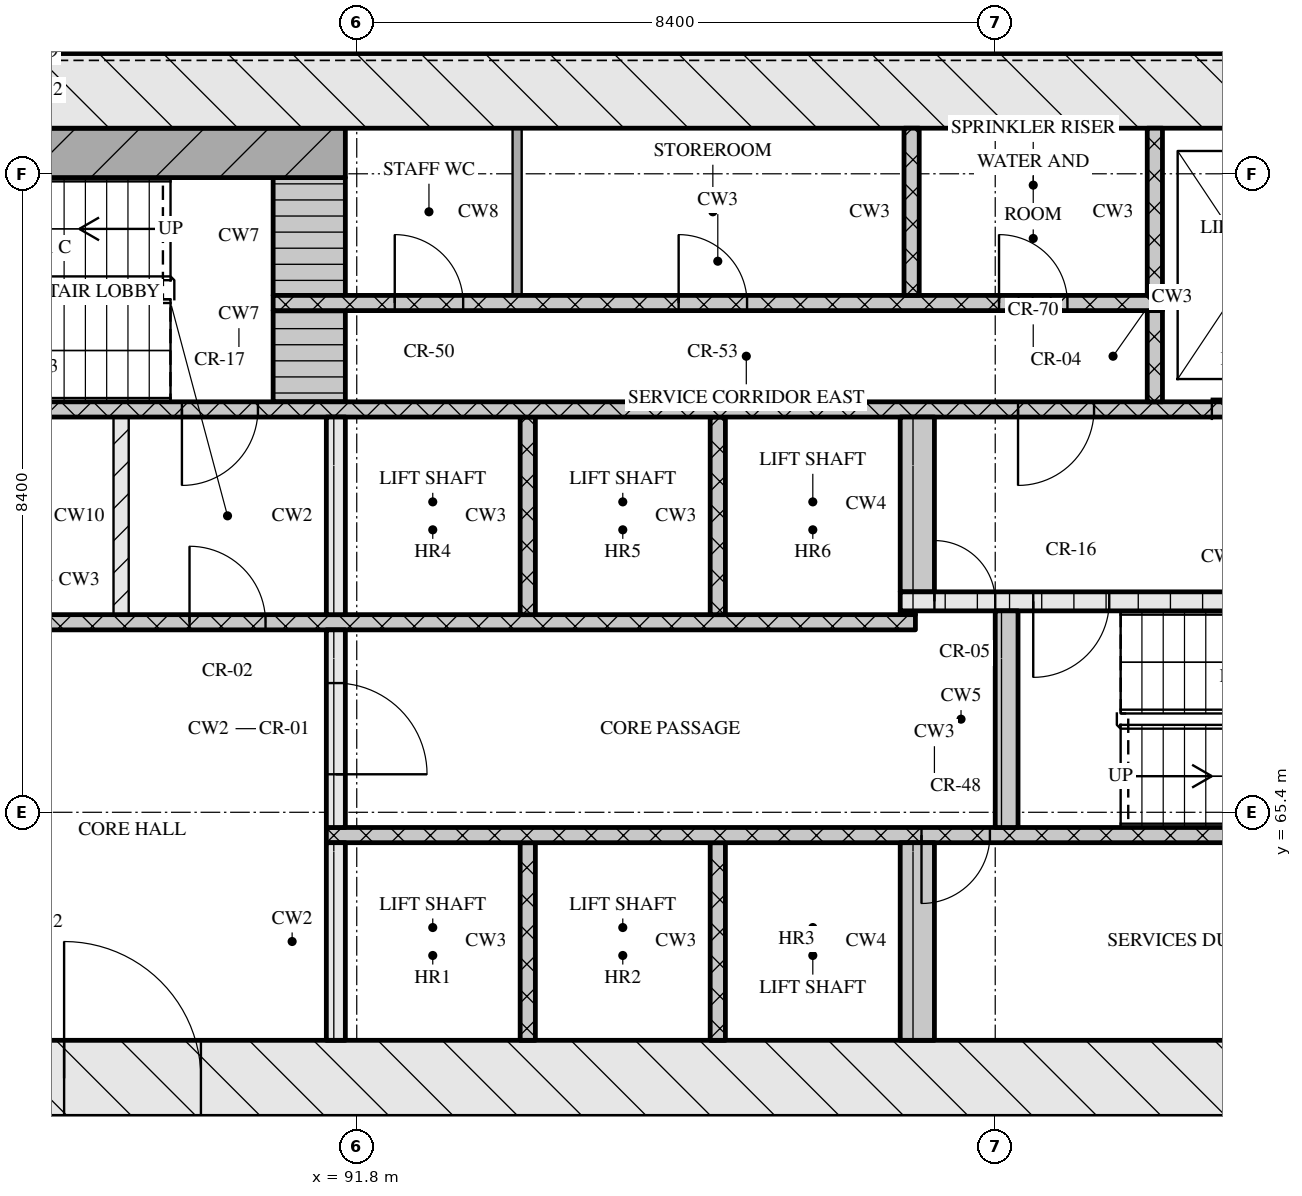
"""IFC4 building model, lengths in metres.
Left out: names, types, materials, properties, quantities, classifications, styles, units other than length and angle.
Written with IfcOpenShell. Run it as: python <this file> out.ifc"""

import sys

from ifc_helpers import new_model, si_unit, direction, frame, frame_2d, origin, place, context, subcontext, project, spatial, rectangle, extrude, element, fill, save


model = new_model("IFC4")
c1 = context("Model", 3, precision=1e-05, world=origin(), true_north=direction((0.0, 1.0)))
c2 = subcontext(c1, "Body", "Model", "MODEL_VIEW")
j1 = project(units=[si_unit("LENGTHUNIT", "METRE"), si_unit("PLANEANGLEUNIT", "RADIAN")], contexts=[c1])
p1 = place(None, origin())
s1 = spatial("IfcSite", under=j1, at=p1, CompositionType="ELEMENT")
p2 = place(p1, origin())
s2 = spatial("IfcBuilding", under=s1, at=p2, CompositionType="ELEMENT")
p3 = place(p2, frame((0.0, 0.0, 109.65)))
s3 = spatial("IfcBuildingStorey", under=s2, at=p3, CompositionType="ELEMENT", Elevation=109.65)
p4 = place(p3, frame((66.8, 61.9, 0.0), z_axis=(0.0, 0.0, 1.0), x_axis=(1.0, 0.0, 0.0)))
e1 = element("IfcWall", 1, at=p4, inside=s3, PredefinedType="SOLIDWALL", context=c2, shape_type="SweptSolid", body=[
    extrude(rectangle(XDim=41.6, YDim=1.0, at=frame_2d((20.8, 0.0))), origin(), (0.0, 0.0, 1.0), 3.32),
])
p5 = place(p4, frame((21.15, 0.0, 0.0)))
e2 = element("IfcOpeningElement", 2, at=p5, cuts=e1, PredefinedType="OPENING", context=c2, shape_type="SweptSolid", body=[
    extrude(rectangle(XDim=1.8, YDim=2.1, at=frame_2d((0.9, 1.05))), frame((0.0, 0.51, 0.0), z_axis=(0.0, -1.0, 0.0), x_axis=(1.0, 0.0, 0.0)), (0.0, 0.0, 1.0), 1.02),
])
p6 = place(p3, frame((66.8, 74.9, 0.0), z_axis=(0.0, 0.0, 1.0), x_axis=(1.0, 0.0, 0.0)))
e3 = element("IfcWall", 3, at=p6, inside=s3, PredefinedType="SOLIDWALL", context=c2, shape_type="SweptSolid", body=[
    extrude(rectangle(XDim=41.6, YDim=1.0, at=frame_2d((20.8, 0.0))), origin(), (0.0, 0.0, 1.0), 3.32),
])
p7 = place(p3, frame((91.525, 62.4, 0.0), z_axis=(0.0, 0.0, 1.0), x_axis=(0.0, 1.0, 0.0)))
e4 = element("IfcWall", 4, at=p7, inside=s3, PredefinedType="SOLIDWALL", context=c2, shape_type="SweptSolid", body=[
    extrude(rectangle(XDim=2.6, YDim=0.25, at=frame_2d((1.3, 0.0))), origin(), (0.0, 0.0, 1.0), 3.32),
])
for number, where, z_axis, x_axis in (
    (5, (94.05, 62.4, 0.0), (0.0, 0.0, 1.0), (0.0, 1.0, 0.0)),
    (6, (96.55, 62.4, 0.0), (0.0, 0.0, 1.0), (0.0, 1.0, 0.0)),
):
    element("IfcWall", number, at=place(p3, frame(where, z_axis=z_axis, x_axis=x_axis)), inside=s3, PredefinedType="SOLIDWALL", context=c2, shape_type="SweptSolid", body=[
        extrude(rectangle(XDim=2.6, YDim=0.2, at=frame_2d((1.3, 0.0))), origin(), (0.0, 0.0, 1.0), 3.32),
    ])
p8 = place(p3, frame((99.175, 62.4, 0.0), z_axis=(0.0, 0.0, 1.0), x_axis=(0.0, 1.0, 0.0)))
e7 = element("IfcWall", 7, at=p8, inside=s3, PredefinedType="SOLIDWALL", context=c2, shape_type="SweptSolid", body=[
    extrude(rectangle(XDim=2.6, YDim=0.45, at=frame_2d((1.3, 0.0))), origin(), (0.0, 0.0, 1.0), 3.32),
])
p9 = place(p3, frame((91.4, 65.1, 0.0), z_axis=(0.0, 0.0, 1.0), x_axis=(1.0, 0.0, 0.0)))
e8 = element("IfcWall", 8, at=p9, inside=s3, PredefinedType="SOLIDWALL", context=c2, shape_type="SweptSolid", body=[
    extrude(rectangle(XDim=16.0, YDim=0.2, at=frame_2d((8.0, 0.0))), origin(), (0.0, 0.0, 1.0), 3.32),
])
p10 = place(p9, frame((7.83, 0.0, 0.0)))
e9 = element("IfcOpeningElement", 9, at=p10, cuts=e8, PredefinedType="OPENING", context=c2, shape_type="SweptSolid", body=[
    extrude(rectangle(XDim=0.9, YDim=2.1, at=frame_2d((0.45, 1.05))), frame((0.0, 0.11, 0.0), z_axis=(0.0, -1.0, 0.0), x_axis=(1.0, 0.0, 0.0)), (0.0, 0.0, 1.0), 0.22),
])
p11 = place(p3, frame((91.525, 65.2, 0.0), z_axis=(0.0, 0.0, 1.0), x_axis=(0.0, 1.0, 0.0)))
e10 = element("IfcWall", 10, at=p11, inside=s3, PredefinedType="SOLIDWALL", context=c2, shape_type="SweptSolid", body=[
    extrude(rectangle(XDim=2.6, YDim=0.25, at=frame_2d((1.3, 0.0))), origin(), (0.0, 0.0, 1.0), 3.32),
])
p12 = place(p11, frame((0.7, 0.0, 0.0)))
e11 = element("IfcOpeningElement", 11, at=p12, cuts=e10, PredefinedType="OPENING", context=c2, shape_type="SweptSolid", body=[
    extrude(rectangle(XDim=1.2, YDim=2.1, at=frame_2d((0.6, 1.05))), frame((0.0, 0.135, 0.0), z_axis=(0.0, -1.0, 0.0), x_axis=(1.0, 0.0, 0.0)), (0.0, 0.0, 1.0), 0.27),
])
p13 = place(p3, frame((100.35, 65.2, 0.0), z_axis=(0.0, 0.0, 1.0), x_axis=(0.0, 1.0, 0.0)))
e12 = element("IfcWall", 12, at=p13, inside=s3, PredefinedType="SOLIDWALL", context=c2, shape_type="SweptSolid", body=[
    extrude(rectangle(XDim=2.85, YDim=0.3, at=frame_2d((1.425, 0.0))), origin(), (0.0, 0.0, 1.0), 3.32),
])
p14 = place(p3, frame((76.05, 67.9, 0.0), z_axis=(0.0, 0.0, 1.0), x_axis=(1.0, 0.0, 0.0)))
e13 = element("IfcWall", 13, at=p14, inside=s3, PredefinedType="SOLIDWALL", context=c2, shape_type="SweptSolid", body=[
    extrude(rectangle(XDim=23.1, YDim=0.2, at=frame_2d((11.55, 0.0))), origin(), (0.0, 0.0, 1.0), 3.32),
])
p15 = place(p14, frame((0.6, 0.0, 0.0)))
e14 = element("IfcOpeningElement", 14, at=p15, cuts=e13, PredefinedType="OPENING", context=c2, shape_type="SweptSolid", body=[
    extrude(rectangle(XDim=1.1, YDim=2.1, at=frame_2d((0.55, 1.05))), frame((0.0, 0.11, 0.0), z_axis=(0.0, -1.0, 0.0), x_axis=(1.0, 0.0, 0.0)), (0.0, 0.0, 1.0), 0.22),
])
p16 = place(p14, frame((3.1, 0.0, 0.0)))
e15 = element("IfcOpeningElement", 15, at=p16, cuts=e13, PredefinedType="OPENING", context=c2, shape_type="SweptSolid", body=[
    extrude(rectangle(XDim=1.1, YDim=2.1, at=frame_2d((0.55, 1.05))), frame((0.0, 0.11, 0.0), z_axis=(0.0, -1.0, 0.0), x_axis=(1.0, 0.0, 0.0)), (0.0, 0.0, 1.0), 0.22),
])
p17 = place(p14, frame((5.6, 0.0, 0.0)))
e16 = element("IfcOpeningElement", 16, at=p17, cuts=e13, PredefinedType="OPENING", context=c2, shape_type="SweptSolid", body=[
    extrude(rectangle(XDim=1.1, YDim=2.1, at=frame_2d((0.55, 1.05))), frame((0.0, 0.11, 0.0), z_axis=(0.0, -1.0, 0.0), x_axis=(1.0, 0.0, 0.0)), (0.0, 0.0, 1.0), 0.22),
])
p18 = place(p14, frame((9.7, 0.0, 0.0)))
e17 = element("IfcOpeningElement", 17, at=p18, cuts=e13, PredefinedType="OPENING", context=c2, shape_type="SweptSolid", body=[
    extrude(rectangle(XDim=0.9, YDim=2.1, at=frame_2d((0.45, 1.05))), frame((0.0, 0.11, 0.0), z_axis=(0.0, -1.0, 0.0), x_axis=(1.0, 0.0, 0.0)), (0.0, 0.0, 1.0), 0.22),
])
p19 = place(p14, frame((13.55, 0.0, 0.0)))
e18 = element("IfcOpeningElement", 18, at=p19, cuts=e13, PredefinedType="OPENING", context=c2, shape_type="SweptSolid", body=[
    extrude(rectangle(XDim=1.0, YDim=2.1, at=frame_2d((0.5, 1.05))), frame((0.0, 0.11, 0.0), z_axis=(0.0, -1.0, 0.0), x_axis=(1.0, 0.0, 0.0)), (0.0, 0.0, 1.0), 0.22),
])
p20 = place(p3, frame((88.7, 68.0, 0.0), z_axis=(0.0, 0.0, 1.0), x_axis=(0.0, 1.0, 0.0)))
e19 = element("IfcWall", 19, at=p20, inside=s3, PredefinedType="PARTITIONING", context=c2, shape_type="SweptSolid", body=[
    extrude(rectangle(XDim=2.6, YDim=0.2, at=frame_2d((1.3, 0.0))), origin(), (0.0, 0.0, 1.0), 3.32),
])
p21 = place(p3, frame((91.525, 68.0, 0.0), z_axis=(0.0, 0.0, 1.0), x_axis=(0.0, 1.0, 0.0)))
e20 = element("IfcWall", 20, at=p21, inside=s3, PredefinedType="SOLIDWALL", context=c2, shape_type="SweptSolid", body=[
    extrude(rectangle(XDim=2.6, YDim=0.25, at=frame_2d((1.3, 0.0))), origin(), (0.0, 0.0, 1.0), 3.32),
])
for number, where, z_axis, x_axis in (
    (21, (94.05, 68.0, 0.0), (0.0, 0.0, 1.0), (0.0, 1.0, 0.0)),
    (22, (96.55, 68.0, 0.0), (0.0, 0.0, 1.0), (0.0, 1.0, 0.0)),
):
    element("IfcWall", number, at=place(p3, frame(where, z_axis=z_axis, x_axis=x_axis)), inside=s3, PredefinedType="SOLIDWALL", context=c2, shape_type="SweptSolid", body=[
        extrude(rectangle(XDim=2.6, YDim=0.2, at=frame_2d((1.3, 0.0))), origin(), (0.0, 0.0, 1.0), 3.32),
    ])
p22 = place(p3, frame((98.95, 68.025, 0.0), z_axis=(0.0, 0.0, 1.0), x_axis=(1.0, 0.0, 0.0)))
e23 = element("IfcWall", 23, at=p22, inside=s3, PredefinedType="SOLIDWALL", context=c2, shape_type="SweptSolid", body=[
    extrude(rectangle(XDim=0.2, YDim=0.05, at=frame_2d((0.1, 0.0))), origin(), (0.0, 0.0, 1.0), 3.32),
])
p23 = place(p3, frame((98.95, 68.175, 0.0), z_axis=(0.0, 0.0, 1.0), x_axis=(1.0, 0.0, 0.0)))
e24 = element("IfcWall", 24, at=p23, inside=s3, PredefinedType="SOLIDWALL", context=c2, shape_type="SweptSolid", body=[
    extrude(rectangle(XDim=8.45, YDim=0.25, at=frame_2d((4.225, 0.0))), origin(), (0.0, 0.0, 1.0), 3.32),
])
p24 = place(p23, frame((0.45, 0.0, 0.0)))
e25 = element("IfcOpeningElement", 25, at=p24, cuts=e24, PredefinedType="OPENING", context=c2, shape_type="SweptSolid", body=[
    extrude(rectangle(XDim=0.8, YDim=2.1, at=frame_2d((0.4, 1.05))), frame((0.0, 0.135, 0.0), z_axis=(0.0, -1.0, 0.0), x_axis=(1.0, 0.0, 0.0)), (0.0, 0.0, 1.0), 0.27),
])
p25 = place(p23, frame((1.75, 0.0, 0.0)))
e26 = element("IfcOpeningElement", 26, at=p25, cuts=e24, PredefinedType="OPENING", context=c2, shape_type="SweptSolid", body=[
    extrude(rectangle(XDim=1.0, YDim=2.1, at=frame_2d((0.5, 1.05))), frame((0.0, 0.135, 0.0), z_axis=(0.0, -1.0, 0.0), x_axis=(1.0, 0.0, 0.0)), (0.0, 0.0, 1.0), 0.27),
])
p26 = place(p3, frame((99.175, 68.3, 0.0), z_axis=(0.0, 0.0, 1.0), x_axis=(0.0, 1.0, 0.0)))
e27 = element("IfcWall", 27, at=p26, inside=s3, PredefinedType="SOLIDWALL", context=c2, shape_type="SweptSolid", body=[
    extrude(rectangle(XDim=2.3, YDim=0.45, at=frame_2d((1.15, 0.0))), origin(), (0.0, 0.0, 1.0), 3.32),
])
p27 = place(p3, frame((67.8, 70.7, 0.0), z_axis=(0.0, 0.0, 1.0), x_axis=(1.0, 0.0, 0.0)))
e28 = element("IfcWall", 28, at=p27, inside=s3, PredefinedType="SOLIDWALL", context=c2, shape_type="SweptSolid", body=[
    extrude(rectangle(XDim=39.6, YDim=0.2, at=frame_2d((19.8, 0.0))), origin(), (0.0, 0.0, 1.0), 3.32),
])
p28 = place(p27, frame((0.65, 0.0, 0.0)))
e29 = element("IfcOpeningElement", 29, at=p28, cuts=e28, PredefinedType="OPENING", context=c2, shape_type="SweptSolid", body=[
    extrude(rectangle(XDim=1.1, YDim=2.1, at=frame_2d((0.55, 1.05))), frame((0.0, 0.11, 0.0), z_axis=(0.0, -1.0, 0.0), x_axis=(1.0, 0.0, 0.0)), (0.0, 0.0, 1.0), 0.22),
])
p29 = place(p27, frame((3.25, 0.0, 0.0)))
e30 = element("IfcOpeningElement", 30, at=p29, cuts=e28, PredefinedType="OPENING", context=c2, shape_type="SweptSolid", body=[
    extrude(rectangle(XDim=1.1, YDim=2.1, at=frame_2d((0.55, 1.05))), frame((0.0, 0.11, 0.0), z_axis=(0.0, -1.0, 0.0), x_axis=(1.0, 0.0, 0.0)), (0.0, 0.0, 1.0), 0.22),
])
p30 = place(p27, frame((5.9, 0.0, 0.0)))
e31 = element("IfcOpeningElement", 31, at=p30, cuts=e28, PredefinedType="OPENING", context=c2, shape_type="SweptSolid", body=[
    extrude(rectangle(XDim=1.0, YDim=2.1, at=frame_2d((0.5, 1.05))), frame((0.0, 0.11, 0.0), z_axis=(0.0, -1.0, 0.0), x_axis=(1.0, 0.0, 0.0)), (0.0, 0.0, 1.0), 0.22),
])
p31 = place(p27, frame((21.7, 0.0, 0.0)))
e32 = element("IfcOpeningElement", 32, at=p31, cuts=e28, PredefinedType="OPENING", context=c2, shape_type="SweptSolid", body=[
    extrude(rectangle(XDim=1.0, YDim=2.1, at=frame_2d((0.5, 1.05))), frame((0.0, 0.11, 0.0), z_axis=(0.0, -1.0, 0.0), x_axis=(1.0, 0.0, 0.0)), (0.0, 0.0, 1.0), 0.22),
])
p32 = place(p27, frame((32.7, 0.0, 0.0)))
e33 = element("IfcOpeningElement", 33, at=p32, cuts=e28, PredefinedType="OPENING", context=c2, shape_type="SweptSolid", body=[
    extrude(rectangle(XDim=1.0, YDim=2.1, at=frame_2d((0.5, 1.05))), frame((0.0, 0.11, 0.0), z_axis=(0.0, -1.0, 0.0), x_axis=(1.0, 0.0, 0.0)), (0.0, 0.0, 1.0), 0.22),
])
p33 = place(p27, frame((35.25, 0.0, 0.0)))
e34 = element("IfcOpeningElement", 34, at=p33, cuts=e28, PredefinedType="OPENING", context=c2, shape_type="SweptSolid", body=[
    extrude(rectangle(XDim=1.1, YDim=2.1, at=frame_2d((0.55, 1.05))), frame((0.0, 0.11, 0.0), z_axis=(0.0, -1.0, 0.0), x_axis=(1.0, 0.0, 0.0)), (0.0, 0.0, 1.0), 0.22),
])
p34 = place(p27, frame((37.85, 0.0, 0.0)))
e35 = element("IfcOpeningElement", 35, at=p34, cuts=e28, PredefinedType="OPENING", context=c2, shape_type="SweptSolid", body=[
    extrude(rectangle(XDim=1.1, YDim=2.1, at=frame_2d((0.55, 1.05))), frame((0.0, 0.11, 0.0), z_axis=(0.0, -1.0, 0.0), x_axis=(1.0, 0.0, 0.0)), (0.0, 0.0, 1.0), 0.22),
])
p35 = place(p3, frame((91.175, 70.8, 0.0), z_axis=(0.0, 0.0, 1.0), x_axis=(0.0, 1.0, 0.0)))
e36 = element("IfcWall", 36, at=p35, inside=s3, PredefinedType="SOLIDWALL", context=c2, shape_type="SweptSolid", body=[
    extrude(rectangle(XDim=1.2, YDim=0.95, at=frame_2d((0.6, 0.0))), origin(), (0.0, 0.0, 1.0), 3.32),
])
p36 = place(p3, frame((102.3, 70.8, 0.0), z_axis=(0.0, 0.0, 1.0), x_axis=(0.0, 1.0, 0.0)))
e37 = element("IfcWall", 37, at=p36, inside=s3, PredefinedType="SOLIDWALL", context=c2, shape_type="SweptSolid", body=[
    extrude(rectangle(XDim=1.2, YDim=0.2, at=frame_2d((0.6, 0.0))), origin(), (0.0, 0.0, 1.0), 3.32),
])
p37 = place(p3, frame((90.7, 72.1, 0.0), z_axis=(0.0, 0.0, 1.0), x_axis=(1.0, 0.0, 0.0)))
e38 = element("IfcWall", 38, at=p37, inside=s3, PredefinedType="SOLIDWALL", context=c2, shape_type="SweptSolid", body=[
    extrude(rectangle(XDim=11.7, YDim=0.2, at=frame_2d((5.85, 0.0))), origin(), (0.0, 0.0, 1.0), 3.32),
])
p38 = place(p37, frame((1.6, 0.0, 0.0)))
e39 = element("IfcOpeningElement", 39, at=p38, cuts=e38, PredefinedType="OPENING", context=c2, shape_type="SweptSolid", body=[
    extrude(rectangle(XDim=0.9, YDim=2.1, at=frame_2d((0.45, 1.05))), frame((0.0, 0.11, 0.0), z_axis=(0.0, -1.0, 0.0), x_axis=(1.0, 0.0, 0.0)), (0.0, 0.0, 1.0), 0.22),
])
p39 = place(p37, frame((5.335, 0.0, 0.0)))
e40 = element("IfcOpeningElement", 40, at=p39, cuts=e38, PredefinedType="OPENING", context=c2, shape_type="SweptSolid", body=[
    extrude(rectangle(XDim=0.9, YDim=2.1, at=frame_2d((0.45, 1.05))), frame((0.0, 0.11, 0.0), z_axis=(0.0, -1.0, 0.0), x_axis=(1.0, 0.0, 0.0)), (0.0, 0.0, 1.0), 0.22),
])
p40 = place(p37, frame((9.55, 0.0, 0.0)))
e41 = element("IfcOpeningElement", 41, at=p40, cuts=e38, PredefinedType="OPENING", context=c2, shape_type="SweptSolid", body=[
    extrude(rectangle(XDim=0.9, YDim=2.1, at=frame_2d((0.45, 1.05))), frame((0.0, 0.11, 0.0), z_axis=(0.0, -1.0, 0.0), x_axis=(1.0, 0.0, 0.0)), (0.0, 0.0, 1.0), 0.22),
])
p41 = place(p3, frame((91.175, 72.2, 0.0), z_axis=(0.0, 0.0, 1.0), x_axis=(0.0, 1.0, 0.0)))
e42 = element("IfcWall", 42, at=p41, inside=s3, PredefinedType="SOLIDWALL", context=c2, shape_type="SweptSolid", body=[
    extrude(rectangle(XDim=1.55, YDim=0.95, at=frame_2d((0.775, 0.0))), origin(), (0.0, 0.0, 1.0), 3.32),
])
p42 = place(p3, frame((93.91, 72.2, 0.0), z_axis=(0.0, 0.0, 1.0), x_axis=(0.0, 1.0, 0.0)))
e43 = element("IfcWall", 43, at=p42, inside=s3, PredefinedType="PARTITIONING", context=c2, shape_type="SweptSolid", body=[
    extrude(rectangle(XDim=2.2, YDim=0.12, at=frame_2d((1.1, 0.0))), origin(), (0.0, 0.0, 1.0), 3.32),
])
for number, where, z_axis, x_axis in (
    (44, (99.1, 72.2, 0.0), (0.0, 0.0, 1.0), (0.0, 1.0, 0.0)),
    (45, (102.3, 72.2, 0.0), (0.0, 0.0, 1.0), (0.0, 1.0, 0.0)),
):
    element("IfcWall", number, at=place(p3, frame(where, z_axis=z_axis, x_axis=x_axis)), inside=s3, PredefinedType="SOLIDWALL", context=c2, shape_type="SweptSolid", body=[
        extrude(rectangle(XDim=2.2, YDim=0.2, at=frame_2d((1.1, 0.0))), origin(), (0.0, 0.0, 1.0), 3.32),
    ])
p43 = place(p3, frame((83.55, 74.075, 0.0), z_axis=(0.0, 0.0, 1.0), x_axis=(1.0, 0.0, 0.0)))
e46 = element("IfcWall", 46, at=p43, inside=s3, PredefinedType="SOLIDWALL", context=c2, shape_type="SweptSolid", body=[
    extrude(rectangle(XDim=8.1, YDim=0.65, at=frame_2d((4.05, 0.0))), origin(), (0.0, 0.0, 1.0), 3.32),
])
p44 = place(p5, origin())
e47 = element("IfcDoor", 47, at=p44, inside=s3, OperationType="DOUBLE_DOOR_SINGLE_SWING", PredefinedType="DOOR", context=c2, shape_type="SweptSolid", body=[
    extrude(rectangle(XDim=1.8, YDim=2.1, at=frame_2d((0.9, 1.05))), frame((0.0, 0.025, 0.0), z_axis=(0.0, -1.0, 0.0), x_axis=(1.0, 0.0, 0.0)), (0.0, 0.0, 1.0), 0.05),
])
fill(e2, e47)
p45 = place(p10, origin())
e48 = element("IfcDoor", 48, at=p45, inside=s3, OperationType="SINGLE_SWING_RIGHT", PredefinedType="DOOR", context=c2, shape_type="SweptSolid", body=[
    extrude(rectangle(XDim=0.9, YDim=2.1, at=frame_2d((0.45, 1.05))), frame((0.0, 0.025, 0.0), z_axis=(0.0, -1.0, 0.0), x_axis=(1.0, 0.0, 0.0)), (0.0, 0.0, 1.0), 0.05),
])
fill(e9, e48)
p46 = place(p12, origin())
e49 = element("IfcDoor", 49, at=p46, inside=s3, OperationType="SINGLE_SWING_RIGHT", PredefinedType="DOOR", context=c2, shape_type="SweptSolid", body=[
    extrude(rectangle(XDim=1.2, YDim=2.1, at=frame_2d((0.6, 1.05))), frame((0.0, 0.025, 0.0), z_axis=(0.0, -1.0, 0.0), x_axis=(1.0, 0.0, 0.0)), (0.0, 0.0, 1.0), 0.05),
])
fill(e11, e49)
p47 = place(p19, origin())
e50 = element("IfcDoor", 50, at=p47, inside=s3, OperationType="SINGLE_SWING_LEFT", PredefinedType="DOOR", context=c2, shape_type="SweptSolid", body=[
    extrude(rectangle(XDim=1.0, YDim=2.1, at=frame_2d((0.5, 1.05))), frame((0.0, 0.025, 0.0), z_axis=(0.0, -1.0, 0.0), x_axis=(1.0, 0.0, 0.0)), (0.0, 0.0, 1.0), 0.05),
])
fill(e18, e50)
p48 = place(p24, origin())
e51 = element("IfcDoor", 51, at=p48, inside=s3, OperationType="SINGLE_SWING_LEFT", PredefinedType="DOOR", context=c2, shape_type="SweptSolid", body=[
    extrude(rectangle(XDim=0.8, YDim=2.1, at=frame_2d((0.4, 1.05))), frame((0.0, 0.025, 0.0), z_axis=(0.0, -1.0, 0.0), x_axis=(1.0, 0.0, 0.0)), (0.0, 0.0, 1.0), 0.05),
])
fill(e25, e51)
p49 = place(p25, origin())
e52 = element("IfcDoor", 52, at=p49, inside=s3, OperationType="SINGLE_SWING_RIGHT", PredefinedType="DOOR", context=c2, shape_type="SweptSolid", body=[
    extrude(rectangle(XDim=1.0, YDim=2.1, at=frame_2d((0.5, 1.05))), frame((0.0, 0.025, 0.0), z_axis=(0.0, -1.0, 0.0), x_axis=(1.0, 0.0, 0.0)), (0.0, 0.0, 1.0), 0.05),
])
fill(e26, e52)
p50 = place(p31, origin())
e53 = element("IfcDoor", 53, at=p50, inside=s3, OperationType="SINGLE_SWING_RIGHT", PredefinedType="DOOR", context=c2, shape_type="SweptSolid", body=[
    extrude(rectangle(XDim=1.0, YDim=2.1, at=frame_2d((0.5, 1.05))), frame((0.0, 0.025, 0.0), z_axis=(0.0, -1.0, 0.0), x_axis=(1.0, 0.0, 0.0)), (0.0, 0.0, 1.0), 0.05),
])
fill(e32, e53)
p51 = place(p32, origin())
e54 = element("IfcDoor", 54, at=p51, inside=s3, OperationType="SINGLE_SWING_RIGHT", PredefinedType="DOOR", context=c2, shape_type="SweptSolid", body=[
    extrude(rectangle(XDim=1.0, YDim=2.1, at=frame_2d((0.5, 1.05))), frame((0.0, 0.025, 0.0), z_axis=(0.0, -1.0, 0.0), x_axis=(1.0, 0.0, 0.0)), (0.0, 0.0, 1.0), 0.05),
])
fill(e33, e54)
p52 = place(p33, origin())
e55 = element("IfcDoor", 55, at=p52, inside=s3, OperationType="SLIDING_TO_RIGHT", PredefinedType="DOOR", context=c2, shape_type="SweptSolid", body=[
    extrude(rectangle(XDim=1.1, YDim=2.1, at=frame_2d((0.55, 1.05))), frame((0.0, 0.025, 0.0), z_axis=(0.0, -1.0, 0.0), x_axis=(1.0, 0.0, 0.0)), (0.0, 0.0, 1.0), 0.05),
])
fill(e34, e55)
p53 = place(p38, origin())
e56 = element("IfcDoor", 56, at=p53, inside=s3, OperationType="SINGLE_SWING_LEFT", PredefinedType="DOOR", context=c2, shape_type="SweptSolid", body=[
    extrude(rectangle(XDim=0.9, YDim=2.1, at=frame_2d((0.45, 1.05))), frame((0.0, 0.025, 0.0), z_axis=(0.0, -1.0, 0.0), x_axis=(1.0, 0.0, 0.0)), (0.0, 0.0, 1.0), 0.05),
])
fill(e39, e56)
p54 = place(p39, origin())
e57 = element("IfcDoor", 57, at=p54, inside=s3, OperationType="SINGLE_SWING_LEFT", PredefinedType="DOOR", context=c2, shape_type="SweptSolid", body=[
    extrude(rectangle(XDim=0.9, YDim=2.1, at=frame_2d((0.45, 1.05))), frame((0.0, 0.025, 0.0), z_axis=(0.0, -1.0, 0.0), x_axis=(1.0, 0.0, 0.0)), (0.0, 0.0, 1.0), 0.05),
])
fill(e40, e57)
p55 = place(p40, origin())
e58 = element("IfcDoor", 58, at=p55, inside=s3, OperationType="SINGLE_SWING_LEFT", PredefinedType="DOOR", context=c2, shape_type="SweptSolid", body=[
    extrude(rectangle(XDim=0.9, YDim=2.1, at=frame_2d((0.45, 1.05))), frame((0.0, 0.025, 0.0), z_axis=(0.0, -1.0, 0.0), x_axis=(1.0, 0.0, 0.0)), (0.0, 0.0, 1.0), 0.05),
])
fill(e41, e58)
save(model, sys.argv[1])
